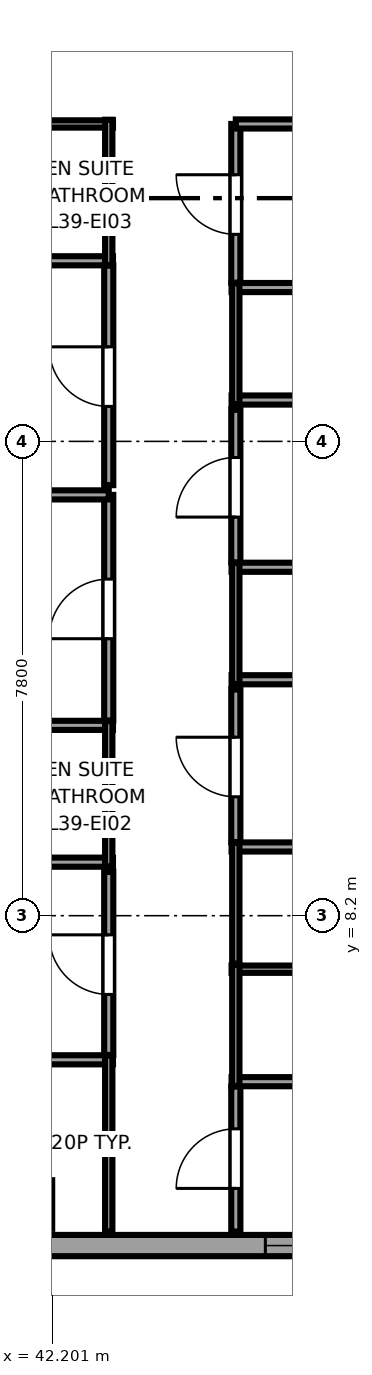
"""IFC4 building model, lengths in metres.
Left out: names, types, materials, properties, quantities, classifications, styles, units other than length and angle.
Written with IfcOpenShell. Run it as: python <this file> out.ifc"""

import sys

from ifc_helpers import new_model, si_unit, direction, frame, frame_2d, origin, origin_2d, place, context, subcontext, project, spatial, rectangle, extrude, source, transform, mapped, element, fill, save


model = new_model("IFC4")
c1 = context("Model", 3, precision=1e-05, world=origin(), true_north=direction((0.0, 1.0)))
c2 = subcontext(c1, "Body", "Model", "MODEL_VIEW")
j1 = project(units=[si_unit("LENGTHUNIT", "METRE"), si_unit("PLANEANGLEUNIT", "RADIAN")], contexts=[c1])
p1 = place(None, origin())
s1 = spatial("IfcSite", under=j1, at=p1, CompositionType="ELEMENT")
p2 = place(p1, origin())
s2 = spatial("IfcBuilding", under=s1, at=p2, CompositionType="ELEMENT")
p3 = place(p2, frame((0.0, 0.0, 150.6)))
s3 = spatial("IfcBuildingStorey", under=s2, at=p3, CompositionType="ELEMENT", Elevation=150.6)
m1 = source(origin(), c2, "Body", "SweptSolid", [
    extrude(rectangle(XDim=0.8, YDim=0.8, at=origin_2d()), origin(), (0.0, 0.0, 1.0), 3.55),
])
p4 = place(p3, frame((41.8, 3.45, 0.0), z_axis=(0.0, 0.0, 1.0), x_axis=(1.0, 0.0, 0.0)))
e1 = element("IfcColumn", 1, at=p4, inside=s3, PredefinedType="COLUMN", context=c2, shape_type="MappedRepresentation", body=[
    mapped(m1, transform((0.0, 0.0, 0.0), x_axis=(1.0, 0.0, 0.0), y_axis=(0.0, 1.0, 0.0), z_axis=(0.0, 0.0, 1.0), scale=1.0)),
])
p5 = place(p3, frame((34.375, 2.775, 0.0), z_axis=(0.0, 0.0, 1.0), x_axis=(1.0, 0.0, 0.0)))
e2 = element("IfcWall", 2, at=p5, inside=s3, PredefinedType="SOLIDWALL", context=c2, shape_type="SweptSolid", body=[
    extrude(rectangle(XDim=15.608, YDim=0.35, at=frame_2d((7.804, 0.0))), origin(), (0.0, 0.0, 1.0), 3.37),
])
p6 = place(p5, frame((1.726, 0.0, 0.68)))
e3 = element("IfcOpeningElement", 3, at=p6, cuts=e2, PredefinedType="OPENING", context=c2, shape_type="SweptSolid", body=[
    extrude(rectangle(XDim=2.55, YDim=1.92, at=frame_2d((1.275, 0.96))), frame((0.0, 0.185, 0.0), z_axis=(0.0, -1.0, 0.0), x_axis=(1.0, 0.0, 0.0)), (0.0, 0.0, 1.0), 0.37),
])
p7 = place(p5, frame((11.331, 0.0, 0.68)))
e4 = element("IfcOpeningElement", 4, at=p7, cuts=e2, PredefinedType="OPENING", context=c2, shape_type="SweptSolid", body=[
    extrude(rectangle(XDim=2.55, YDim=1.92, at=frame_2d((1.275, 0.96))), frame((0.0, 0.185, 0.0), z_axis=(0.0, -1.0, 0.0), x_axis=(1.0, 0.0, 0.0)), (0.0, 0.0, 1.0), 0.37),
])
p8 = place(p3, frame((39.46, 5.83, 0.0), z_axis=(0.0, 0.0, 1.0), x_axis=(1.0, 0.0, 0.0)))
e5 = element("IfcWall", 5, at=p8, inside=s3, PredefinedType="PARTITIONING", context=c2, shape_type="SweptSolid", body=[
    extrude(rectangle(XDim=3.74, YDim=0.15, at=frame_2d((1.87, 0.0))), origin(), (0.0, 0.0, 1.0), 3.37),
])
p9 = place(p3, frame((43.13, 3.005, 0.0), z_axis=(0.0, 0.0, 1.0), x_axis=(0.0, 1.0, 0.0)))
e6 = element("IfcWall", 6, at=p9, inside=s3, PredefinedType="PLUMBINGWALL", context=c2, shape_type="SweptSolid", body=[
    extrude(rectangle(XDim=2.895, YDim=0.12, at=frame_2d((1.448, 0.0))), origin(), (0.0, 0.0, 1.0), 3.37),
])
p10 = place(p3, frame((34.65, 9.08, 0.0), z_axis=(0.0, 0.0, 1.0), x_axis=(1.0, 0.0, 0.0)))
e7 = element("IfcWall", 7, at=p10, inside=s3, PredefinedType="PARTITIONING", context=c2, shape_type="SweptSolid", body=[
    extrude(rectangle(XDim=8.55, YDim=0.15, at=frame_2d((4.275, 0.0))), origin(), (0.0, 0.0, 1.0), 3.37),
])
p11 = place(p3, frame((40.61, 11.33, 0.0), z_axis=(0.0, 0.0, 1.0), x_axis=(1.0, 0.0, 0.0)))
e8 = element("IfcWall", 8, at=p11, inside=s3, PredefinedType="PARTITIONING", context=c2, shape_type="SweptSolid", body=[
    extrude(rectangle(XDim=2.59, YDim=0.15, at=frame_2d((1.295, 0.0))), origin(), (0.0, 0.0, 1.0), 3.37),
])
p12 = place(p3, frame((43.13, 9.01, 0.0), z_axis=(0.0, 0.0, 1.0), x_axis=(0.0, 1.0, 0.0)))
e9 = element("IfcWall", 9, at=p12, inside=s3, PredefinedType="PLUMBINGWALL", context=c2, shape_type="SweptSolid", body=[
    extrude(rectangle(XDim=2.39, YDim=0.12, at=frame_2d((1.195, 0.0))), origin(), (0.0, 0.0, 1.0), 3.37),
])
p13 = place(p3, frame((40.61, 18.97, 0.0), z_axis=(0.0, 0.0, 1.0), x_axis=(1.0, 0.0, 0.0)))
e10 = element("IfcWall", 10, at=p13, inside=s3, PredefinedType="PARTITIONING", context=c2, shape_type="SweptSolid", body=[
    extrude(rectangle(XDim=2.59, YDim=0.15, at=frame_2d((1.295, 0.0))), origin(), (0.0, 0.0, 1.0), 3.37),
])
p14 = place(p3, frame((40.61, 21.22, 0.0), z_axis=(0.0, 0.0, 1.0), x_axis=(1.0, 0.0, 0.0)))
e11 = element("IfcWall", 11, at=p14, inside=s3, PredefinedType="PLUMBINGWALL", context=c2, shape_type="SweptSolid", body=[
    extrude(rectangle(XDim=2.59, YDim=0.12, at=frame_2d((1.295, 0.0))), origin(), (0.0, 0.0, 1.0), 3.37),
])
p15 = place(p3, frame((43.13, 18.9, 0.0), z_axis=(0.0, 0.0, 1.0), x_axis=(0.0, 1.0, 0.0)))
e12 = element("IfcWall", 12, at=p15, inside=s3, PredefinedType="PLUMBINGWALL", context=c2, shape_type="SweptSolid", body=[
    extrude(rectangle(XDim=2.39, YDim=0.12, at=frame_2d((1.195, 0.0))), origin(), (0.0, 0.0, 1.0), 3.37),
])
p16 = place(p3, frame((45.15, 5.47, 0.0), z_axis=(0.0, 0.0, 1.0), x_axis=(1.0, 0.0, 0.0)))
e13 = element("IfcWall", 13, at=p16, inside=s3, PredefinedType="PARTITIONING", context=c2, shape_type="SweptSolid", body=[
    extrude(rectangle(XDim=2.59, YDim=0.15, at=frame_2d((1.295, 0.0))), origin(), (0.0, 0.0, 1.0), 3.37),
])
p17 = place(p3, frame((45.15, 7.32, 0.0), z_axis=(0.0, 0.0, 1.0), x_axis=(1.0, 0.0, 0.0)))
e14 = element("IfcWall", 14, at=p17, inside=s3, PredefinedType="PLUMBINGWALL", context=c2, shape_type="SweptSolid", body=[
    extrude(rectangle(XDim=2.59, YDim=0.12, at=frame_2d((1.295, 0.0))), origin(), (0.0, 0.0, 1.0), 3.37),
])
p18 = place(p3, frame((45.22, 5.4, 0.0), z_axis=(0.0, 0.0, 1.0), x_axis=(0.0, 1.0, 0.0)))
e15 = element("IfcWall", 15, at=p18, inside=s3, PredefinedType="PLUMBINGWALL", context=c2, shape_type="SweptSolid", body=[
    extrude(rectangle(XDim=1.99, YDim=0.12, at=frame_2d((0.995, 0.0))), origin(), (0.0, 0.0, 1.0), 3.37),
])
p19 = place(p3, frame((45.15, 9.33, 0.0), z_axis=(0.0, 0.0, 1.0), x_axis=(1.0, 0.0, 0.0)))
e16 = element("IfcWall", 16, at=p19, inside=s3, PredefinedType="PARTITIONING", context=c2, shape_type="SweptSolid", body=[
    extrude(rectangle(XDim=2.59, YDim=0.15, at=frame_2d((1.295, 0.0))), origin(), (0.0, 0.0, 1.0), 3.37),
])
p20 = place(p3, frame((45.22, 7.41, 0.0), z_axis=(0.0, 0.0, 1.0), x_axis=(0.0, 1.0, 0.0)))
e17 = element("IfcWall", 17, at=p20, inside=s3, PredefinedType="PLUMBINGWALL", context=c2, shape_type="SweptSolid", body=[
    extrude(rectangle(XDim=1.99, YDim=0.12, at=frame_2d((0.995, 0.0))), origin(), (0.0, 0.0, 1.0), 3.37),
])
p21 = place(p3, frame((45.15, 12.08, 0.0), z_axis=(0.0, 0.0, 1.0), x_axis=(1.0, 0.0, 0.0)))
e18 = element("IfcWall", 18, at=p21, inside=s3, PredefinedType="PARTITIONING", context=c2, shape_type="SweptSolid", body=[
    extrude(rectangle(XDim=8.845, YDim=0.15, at=frame_2d((4.423, 0.0))), origin(), (0.0, 0.0, 1.0), 3.37),
])
p22 = place(p3, frame((45.15, 13.93, 0.0), z_axis=(0.0, 0.0, 1.0), x_axis=(1.0, 0.0, 0.0)))
e19 = element("IfcWall", 19, at=p22, inside=s3, PredefinedType="PARTITIONING", context=c2, shape_type="SweptSolid", body=[
    extrude(rectangle(XDim=2.59, YDim=0.15, at=frame_2d((1.295, 0.0))), origin(), (0.0, 0.0, 1.0), 3.37),
])
p23 = place(p3, frame((45.22, 12.01, 0.0), z_axis=(0.0, 0.0, 1.0), x_axis=(0.0, 1.0, 0.0)))
e20 = element("IfcWall", 20, at=p23, inside=s3, PredefinedType="PLUMBINGWALL", context=c2, shape_type="SweptSolid", body=[
    extrude(rectangle(XDim=1.99, YDim=0.12, at=frame_2d((0.995, 0.0))), origin(), (0.0, 0.0, 1.0), 3.37),
])
p24 = place(p3, frame((45.15, 16.68, 0.0), z_axis=(0.0, 0.0, 1.0), x_axis=(1.0, 0.0, 0.0)))
e21 = element("IfcWall", 21, at=p24, inside=s3, PredefinedType="PARTITIONING", context=c2, shape_type="SweptSolid", body=[
    extrude(rectangle(XDim=8.845, YDim=0.15, at=frame_2d((4.423, 0.0))), origin(), (0.0, 0.0, 1.0), 3.37),
])
p25 = place(p3, frame((45.15, 18.53, 0.0), z_axis=(0.0, 0.0, 1.0), x_axis=(1.0, 0.0, 0.0)))
e22 = element("IfcWall", 22, at=p25, inside=s3, PredefinedType="PARTITIONING", context=c2, shape_type="SweptSolid", body=[
    extrude(rectangle(XDim=2.59, YDim=0.15, at=frame_2d((1.295, 0.0))), origin(), (0.0, 0.0, 1.0), 3.37),
])
p26 = place(p3, frame((45.22, 16.61, 0.0), z_axis=(0.0, 0.0, 1.0), x_axis=(0.0, 1.0, 0.0)))
e23 = element("IfcWall", 23, at=p26, inside=s3, PredefinedType="PLUMBINGWALL", context=c2, shape_type="SweptSolid", body=[
    extrude(rectangle(XDim=1.99, YDim=0.12, at=frame_2d((0.995, 0.0))), origin(), (0.0, 0.0, 1.0), 3.37),
])
p27 = place(p3, frame((43.13, 5.91, 0.0), z_axis=(0.0, 0.0, 1.0), x_axis=(0.0, 1.0, 0.0)))
e24 = element("IfcWall", 24, at=p27, inside=s3, PredefinedType="PARTITIONING", context=c2, shape_type="SweptSolid", body=[
    extrude(rectangle(XDim=3.01, YDim=0.15, at=frame_2d((1.505, 0.0))), origin(), (0.0, 0.0, 1.0), 3.37),
])
p28 = place(p27, frame((0.995, 0.0, 0.0)))
e25 = element("IfcOpeningElement", 25, at=p28, cuts=e24, PredefinedType="OPENING", context=c2, shape_type="SweptSolid", body=[
    extrude(rectangle(XDim=0.98, YDim=2.12, at=frame_2d((0.49, 1.06))), frame((0.0, 0.085, 0.0), z_axis=(0.0, -1.0, 0.0), x_axis=(1.0, 0.0, 0.0)), (0.0, 0.0, 1.0), 0.17),
])
p29 = place(p3, frame((43.13, 11.41, 0.0), z_axis=(0.0, 0.0, 1.0), x_axis=(0.0, 1.0, 0.0)))
e26 = element("IfcWall", 26, at=p29, inside=s3, PredefinedType="PARTITIONING", context=c2, shape_type="SweptSolid", body=[
    extrude(rectangle(XDim=3.71, YDim=0.15, at=frame_2d((1.855, 0.0))), origin(), (0.0, 0.0, 1.0), 3.37),
])
p30 = place(p29, frame((1.345, 0.0, 0.0)))
e27 = element("IfcOpeningElement", 27, at=p30, cuts=e26, PredefinedType="OPENING", context=c2, shape_type="SweptSolid", body=[
    extrude(rectangle(XDim=0.98, YDim=2.12, at=frame_2d((0.49, 1.06))), frame((0.0, 0.085, 0.0), z_axis=(0.0, -1.0, 0.0), x_axis=(1.0, 0.0, 0.0)), (0.0, 0.0, 1.0), 0.17),
])
p31 = place(p3, frame((34.65, 15.12, 0.0), z_axis=(0.0, 0.0, 1.0), x_axis=(1.0, 0.0, 0.0)))
e28 = element("IfcWall", 28, at=p31, inside=s3, PredefinedType="PARTITIONING", context=c2, shape_type="SweptSolid", body=[
    extrude(rectangle(XDim=8.48, YDim=0.15, at=frame_2d((4.24, 0.0))), origin(), (0.0, 0.0, 1.0), 3.37),
])
p32 = place(p3, frame((43.13, 15.28, 0.0), z_axis=(0.0, 0.0, 1.0), x_axis=(0.0, 1.0, 0.0)))
e29 = element("IfcWall", 29, at=p32, inside=s3, PredefinedType="PARTITIONING", context=c2, shape_type="SweptSolid", body=[
    extrude(rectangle(XDim=3.61, YDim=0.15, at=frame_2d((1.805, 0.0))), origin(), (0.0, 0.0, 1.0), 3.37),
])
p33 = place(p32, frame((1.295, 0.0, 0.0)))
e30 = element("IfcOpeningElement", 30, at=p33, cuts=e29, PredefinedType="OPENING", context=c2, shape_type="SweptSolid", body=[
    extrude(rectangle(XDim=0.98, YDim=2.12, at=frame_2d((0.49, 1.06))), frame((0.0, 0.085, 0.0), z_axis=(0.0, -1.0, 0.0), x_axis=(1.0, 0.0, 0.0)), (0.0, 0.0, 1.0), 0.17),
])
p34 = place(p3, frame((45.22, 3.005, 0.0), z_axis=(0.0, 0.0, 1.0), x_axis=(0.0, 1.0, 0.0)))
e31 = element("IfcWall", 31, at=p34, inside=s3, PredefinedType="PARTITIONING", context=c2, shape_type="SweptSolid", body=[
    extrude(rectangle(XDim=2.385, YDim=0.15, at=frame_2d((1.192, 0.0))), origin(), (0.0, 0.0, 1.0), 3.37),
])
p35 = place(p34, frame((0.71, 0.0, 0.0)))
e32 = element("IfcOpeningElement", 32, at=p35, cuts=e31, PredefinedType="OPENING", context=c2, shape_type="SweptSolid", body=[
    extrude(rectangle(XDim=0.98, YDim=2.12, at=frame_2d((0.49, 1.06))), frame((0.0, 0.085, 0.0), z_axis=(0.0, -1.0, 0.0), x_axis=(1.0, 0.0, 0.0)), (0.0, 0.0, 1.0), 0.17),
])
p36 = place(p3, frame((45.22, 9.41, 0.0), z_axis=(0.0, 0.0, 1.0), x_axis=(0.0, 1.0, 0.0)))
e33 = element("IfcWall", 33, at=p36, inside=s3, PredefinedType="PARTITIONING", context=c2, shape_type="SweptSolid", body=[
    extrude(rectangle(XDim=2.51, YDim=0.15, at=frame_2d((1.255, 0.0))), origin(), (0.0, 0.0, 1.0), 3.37),
])
p37 = place(p36, frame((0.745, 0.0, 0.0)))
e34 = element("IfcOpeningElement", 34, at=p37, cuts=e33, PredefinedType="OPENING", context=c2, shape_type="SweptSolid", body=[
    extrude(rectangle(XDim=0.98, YDim=2.12, at=frame_2d((0.49, 1.06))), frame((0.0, 0.085, 0.0), z_axis=(0.0, -1.0, 0.0), x_axis=(1.0, 0.0, 0.0)), (0.0, 0.0, 1.0), 0.17),
])
p38 = place(p3, frame((45.22, 14.01, 0.0), z_axis=(0.0, 0.0, 1.0), x_axis=(0.0, 1.0, 0.0)))
e35 = element("IfcWall", 35, at=p38, inside=s3, PredefinedType="PARTITIONING", context=c2, shape_type="SweptSolid", body=[
    extrude(rectangle(XDim=2.51, YDim=0.15, at=frame_2d((1.255, 0.0))), origin(), (0.0, 0.0, 1.0), 3.37),
])
p39 = place(p38, frame((0.745, 0.0, 0.0)))
e36 = element("IfcOpeningElement", 36, at=p39, cuts=e35, PredefinedType="OPENING", context=c2, shape_type="SweptSolid", body=[
    extrude(rectangle(XDim=0.98, YDim=2.12, at=frame_2d((0.49, 1.06))), frame((0.0, 0.085, 0.0), z_axis=(0.0, -1.0, 0.0), x_axis=(1.0, 0.0, 0.0)), (0.0, 0.0, 1.0), 0.17),
])
p40 = place(p3, frame((45.22, 18.61, 0.0), z_axis=(0.0, 0.0, 1.0), x_axis=(0.0, 1.0, 0.0)))
e37 = element("IfcWall", 37, at=p40, inside=s3, PredefinedType="PARTITIONING", context=c2, shape_type="SweptSolid", body=[
    extrude(rectangle(XDim=2.61, YDim=0.15, at=frame_2d((1.305, 0.0))), origin(), (0.0, 0.0, 1.0), 3.37),
])
p41 = place(p40, frame((0.795, 0.0, 0.0)))
e38 = element("IfcOpeningElement", 38, at=p41, cuts=e37, PredefinedType="OPENING", context=c2, shape_type="SweptSolid", body=[
    extrude(rectangle(XDim=0.98, YDim=2.12, at=frame_2d((0.49, 1.06))), frame((0.0, 0.085, 0.0), z_axis=(0.0, -1.0, 0.0), x_axis=(1.0, 0.0, 0.0)), (0.0, 0.0, 1.0), 0.17),
])
p42 = place(p3, frame((45.22, 21.22, 0.0), z_axis=(0.0, 0.0, 1.0), x_axis=(1.0, 0.0, 0.0)))
e39 = element("IfcWall", 39, at=p42, inside=s3, PredefinedType="PARTITIONING", context=c2, shape_type="SweptSolid", body=[
    extrude(rectangle(XDim=8.775, YDim=0.15, at=frame_2d((4.388, 0.0))), origin(), (0.0, 0.0, 1.0), 3.37),
])
m2 = source(origin(), c2, "Body", "SweptSolid", [
    extrude(rectangle(XDim=2.55, YDim=1.92, at=frame_2d((1.275, 0.96))), frame((0.0, 0.09, 0.0), z_axis=(0.0, -1.0, 0.0), x_axis=(1.0, 0.0, 0.0)), (0.0, 0.0, 1.0), 0.06),
])
p43 = place(p7, origin())
e40 = element("IfcWindow", 40, at=p43, inside=s3, PartitioningType="TRIPLE_PANEL_HORIZONTAL", PredefinedType="WINDOW", context=c2, shape_type="MappedRepresentation", body=[
    mapped(m2, transform((0.0, 0.0, 0.0), x_axis=(1.0, 0.0, 0.0), y_axis=(0.0, 1.0, 0.0), z_axis=(0.0, 0.0, 1.0), scale=1.0)),
])
fill(e4, e40)
m3 = source(origin(), c2, "Body", "SweptSolid", [
    extrude(rectangle(XDim=0.98, YDim=2.12, at=frame_2d((0.49, 1.06))), frame((0.0, 0.025, 0.0), z_axis=(0.0, -1.0, 0.0), x_axis=(1.0, 0.0, 0.0)), (0.0, 0.0, 1.0), 0.05),
])
p44 = place(p28, origin())
e41 = element("IfcDoor", 41, at=p44, inside=s3, OperationType="SINGLE_SWING_RIGHT", PredefinedType="DOOR", context=c2, shape_type="MappedRepresentation", body=[
    mapped(m3, transform((0.0, 0.0, 0.0), x_axis=(1.0, 0.0, 0.0), y_axis=(0.0, 1.0, 0.0), z_axis=(0.0, 0.0, 1.0), scale=1.0)),
])
fill(e25, e41)
p45 = place(p30, origin())
e42 = element("IfcDoor", 42, at=p45, inside=s3, OperationType="SINGLE_SWING_LEFT", PredefinedType="DOOR", context=c2, shape_type="MappedRepresentation", body=[
    mapped(m3, transform((0.0, 0.0, 0.0), x_axis=(1.0, 0.0, 0.0), y_axis=(0.0, 1.0, 0.0), z_axis=(0.0, 0.0, 1.0), scale=1.0)),
])
fill(e27, e42)
p46 = place(p33, origin())
e43 = element("IfcDoor", 43, at=p46, inside=s3, OperationType="SINGLE_SWING_RIGHT", PredefinedType="DOOR", context=c2, shape_type="MappedRepresentation", body=[
    mapped(m3, transform((0.0, 0.0, 0.0), x_axis=(1.0, 0.0, 0.0), y_axis=(0.0, 1.0, 0.0), z_axis=(0.0, 0.0, 1.0), scale=1.0)),
])
fill(e30, e43)
p47 = place(p35, origin())
e44 = element("IfcDoor", 44, at=p47, inside=s3, OperationType="SINGLE_SWING_LEFT", PredefinedType="DOOR", context=c2, shape_type="MappedRepresentation", body=[
    mapped(m3, transform((0.0, 0.0, 0.0), x_axis=(1.0, 0.0, 0.0), y_axis=(0.0, 1.0, 0.0), z_axis=(0.0, 0.0, 1.0), scale=1.0)),
])
fill(e32, e44)
p48 = place(p37, origin())
e45 = element("IfcDoor", 45, at=p48, inside=s3, OperationType="SINGLE_SWING_RIGHT", PredefinedType="DOOR", context=c2, shape_type="MappedRepresentation", body=[
    mapped(m3, transform((0.0, 0.0, 0.0), x_axis=(1.0, 0.0, 0.0), y_axis=(0.0, 1.0, 0.0), z_axis=(0.0, 0.0, 1.0), scale=1.0)),
])
fill(e34, e45)
p49 = place(p39, origin())
e46 = element("IfcDoor", 46, at=p49, inside=s3, OperationType="SINGLE_SWING_LEFT", PredefinedType="DOOR", context=c2, shape_type="MappedRepresentation", body=[
    mapped(m3, transform((0.0, 0.0, 0.0), x_axis=(1.0, 0.0, 0.0), y_axis=(0.0, 1.0, 0.0), z_axis=(0.0, 0.0, 1.0), scale=1.0)),
])
fill(e36, e46)
p50 = place(p41, origin())
e47 = element("IfcDoor", 47, at=p50, inside=s3, OperationType="SINGLE_SWING_RIGHT", PredefinedType="DOOR", context=c2, shape_type="MappedRepresentation", body=[
    mapped(m3, transform((0.0, 0.0, 0.0), x_axis=(1.0, 0.0, 0.0), y_axis=(0.0, 1.0, 0.0), z_axis=(0.0, 0.0, 1.0), scale=1.0)),
])
fill(e38, e47)
save(model, sys.argv[1])
